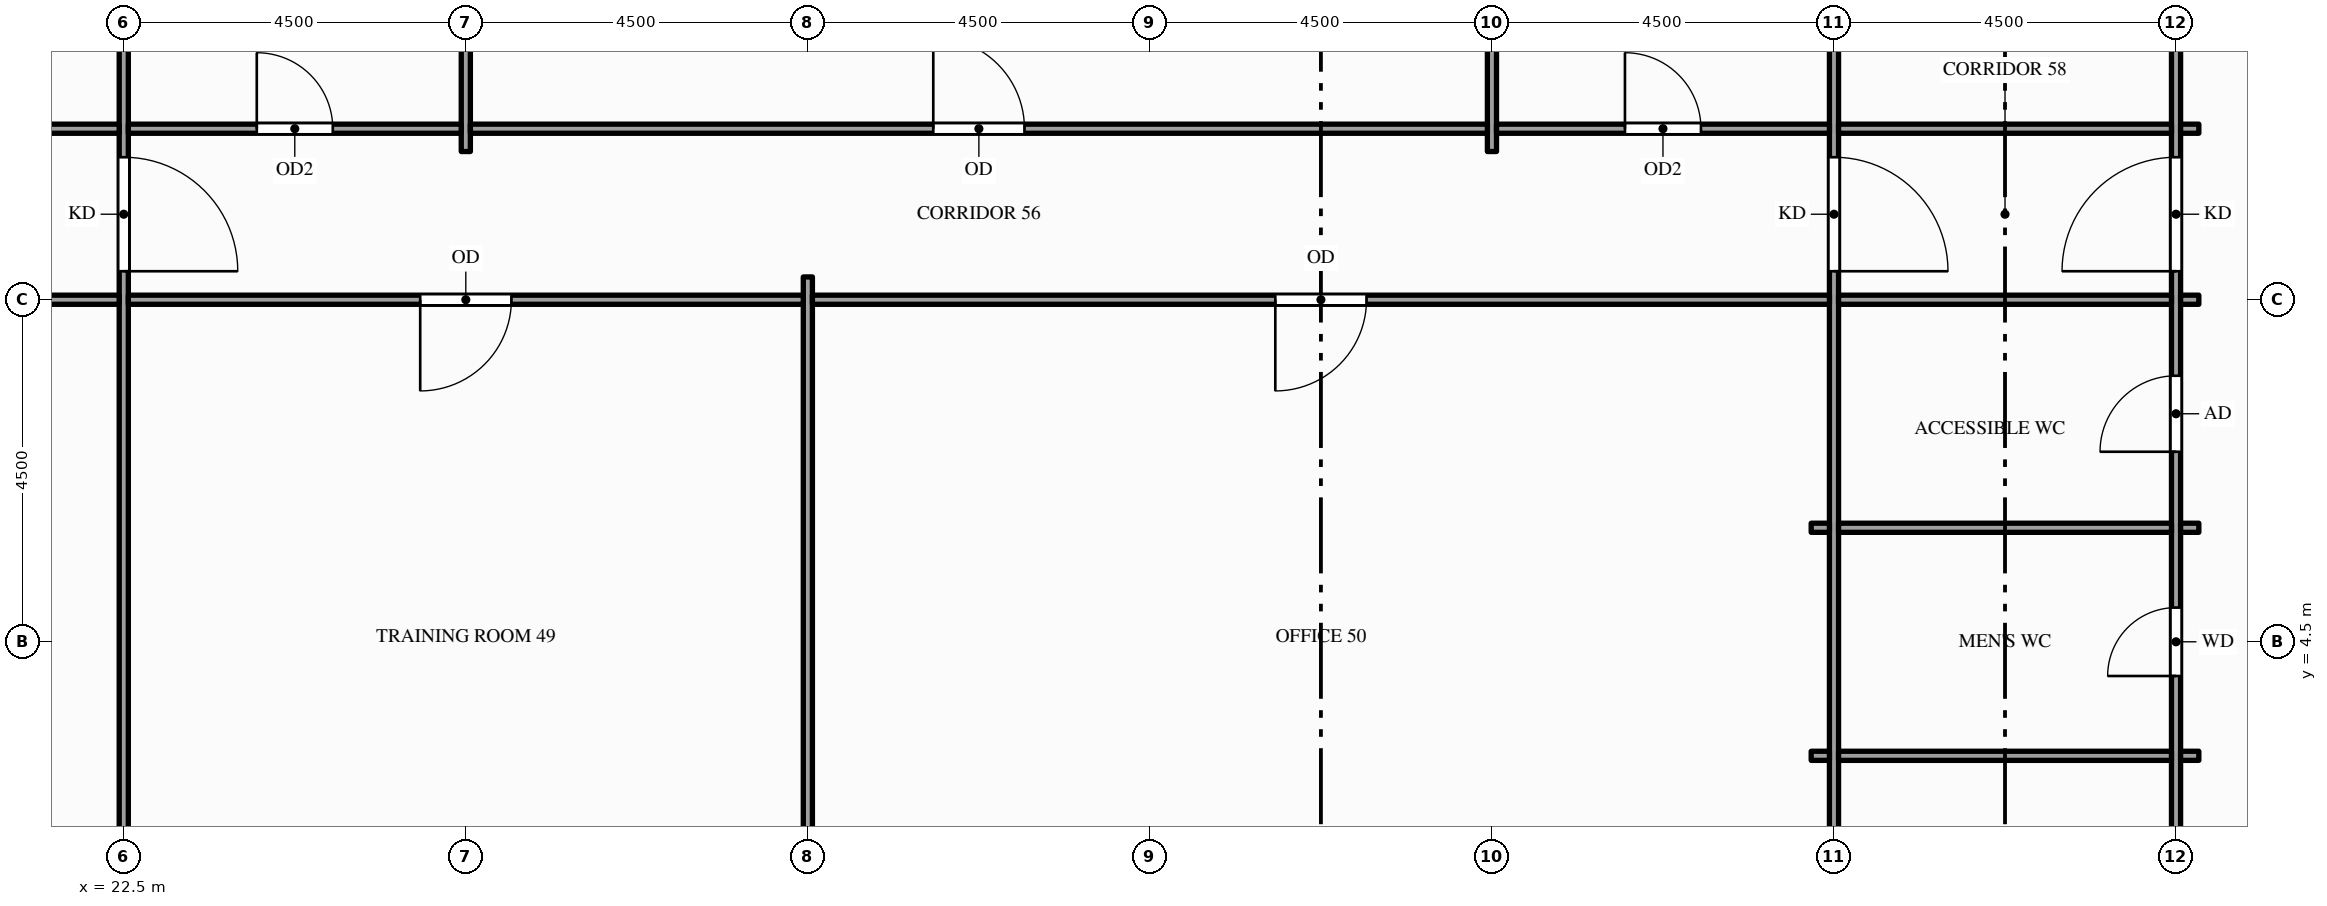
"""IFC4 building model, lengths in metres.
Left out: names, types, materials, properties, quantities, classifications, styles, units other than length and angle.
Written with IfcOpenShell. Run it as: python <this file> out.ifc"""

import sys

from ifc_helpers import new_model, si_unit, direction, frame, frame_2d, origin, place, context, subcontext, project, spatial, rectangle, extrude, element, fill, save


model = new_model("IFC4")
c1 = context("Model", 3, precision=1e-05, world=origin(), true_north=direction((0.0, 1.0)))
c2 = subcontext(c1, "Body", "Model", "MODEL_VIEW")
j1 = project(units=[si_unit("LENGTHUNIT", "METRE"), si_unit("PLANEANGLEUNIT", "RADIAN")], contexts=[c1])
p1 = place(None, origin())
s1 = spatial("IfcSite", under=j1, at=p1, CompositionType="ELEMENT")
p2 = place(p1, origin())
s2 = spatial("IfcBuilding", under=s1, at=p2, CompositionType="ELEMENT")
p3 = place(p2, frame((0.0, 0.0, 24.0)))
s3 = spatial("IfcBuildingStorey", under=s2, at=p3, CompositionType="ELEMENT", Elevation=24.0)
p4 = place(p3, frame((22.5, 0.15, 0.0), z_axis=(0.0, 0.0, 1.0), x_axis=(0.0, 1.0, 0.0)))
e1 = element("IfcWall", 1, at=p4, inside=s3, PredefinedType="PARTITIONING", context=c2, shape_type="SweptSolid", body=[
    extrude(rectangle(XDim=35.95, YDim=0.12, at=frame_2d((17.975, 0.0))), origin(), (0.0, 0.0, 1.0), 3.3),
])
p5 = place(p4, frame((9.225, 0.0, 0.0)))
e2 = element("IfcOpeningElement", 2, at=p5, cuts=e1, PredefinedType="OPENING", context=c2, shape_type="SweptSolid", body=[
    extrude(rectangle(XDim=1.5, YDim=2.1, at=frame_2d((0.75, 1.05))), frame((0.0, 0.07, 0.0), z_axis=(0.0, -1.0, 0.0), x_axis=(1.0, 0.0, 0.0)), (0.0, 0.0, 1.0), 0.14),
])
p6 = place(p4, frame((32.7, 0.0, 0.0)))
e3 = element("IfcOpeningElement", 3, at=p6, cuts=e1, PredefinedType="OPENING", context=c2, shape_type="SweptSolid", body=[
    extrude(rectangle(XDim=1.8, YDim=2.1, at=frame_2d((0.9, 1.05))), frame((0.0, 0.07, 0.0), z_axis=(0.0, -1.0, 0.0), x_axis=(1.0, 0.0, 0.0)), (0.0, 0.0, 1.0), 0.14),
])
p7 = place(p3, frame((27.0, 10.95, 0.0), z_axis=(0.0, 0.0, 1.0), x_axis=(0.0, 1.0, 0.0)))
e4 = element("IfcWall", 4, at=p7, inside=s3, PredefinedType="PARTITIONING", context=c2, shape_type="SweptSolid", body=[
    extrude(rectangle(XDim=11.85, YDim=0.12, at=frame_2d((5.925, 0.0))), origin(), (0.0, 0.0, 1.0), 3.938),
])
p8 = place(p3, frame((31.5, 0.15, 0.0), z_axis=(0.0, 0.0, 1.0), x_axis=(0.0, 1.0, 0.0)))
e5 = element("IfcWall", 5, at=p8, inside=s3, PredefinedType="PARTITIONING", context=c2, shape_type="SweptSolid", body=[
    extrude(rectangle(XDim=9.15, YDim=0.12, at=frame_2d((4.575, 0.0))), origin(), (0.0, 0.0, 1.0), 3.3),
])
p9 = place(p3, frame((40.5, 10.95, 0.0), z_axis=(0.0, 0.0, 1.0), x_axis=(0.0, 1.0, 0.0)))
e6 = element("IfcWall", 6, at=p9, inside=s3, PredefinedType="PARTITIONING", context=c2, shape_type="SweptSolid", body=[
    extrude(rectangle(XDim=11.85, YDim=0.12, at=frame_2d((5.925, 0.0))), origin(), (0.0, 0.0, 1.0), 3.938),
])
p10 = place(p3, frame((45.0, 0.15, 0.0), z_axis=(0.0, 0.0, 1.0), x_axis=(0.0, 1.0, 0.0)))
e7 = element("IfcWall", 7, at=p10, inside=s3, PredefinedType="PARTITIONING", context=c2, shape_type="SweptSolid", body=[
    extrude(rectangle(XDim=22.65, YDim=0.12, at=frame_2d((11.325, 0.0))), origin(), (0.0, 0.0, 1.0), 3.3),
])
p11 = place(p10, frame((9.225, 0.0, 0.0)))
e8 = element("IfcOpeningElement", 8, at=p11, cuts=e7, PredefinedType="OPENING", context=c2, shape_type="SweptSolid", body=[
    extrude(rectangle(XDim=1.5, YDim=2.1, at=frame_2d((0.75, 1.05))), frame((0.0, 0.07, 0.0), z_axis=(0.0, -1.0, 0.0), x_axis=(1.0, 0.0, 0.0)), (0.0, 0.0, 1.0), 0.14),
])
p12 = place(p3, frame((49.5, 0.15, 0.0), z_axis=(0.0, 0.0, 1.0), x_axis=(0.0, 1.0, 0.0)))
e9 = element("IfcWall", 9, at=p12, inside=s3, PredefinedType="PARTITIONING", context=c2, shape_type="SweptSolid", body=[
    extrude(rectangle(XDim=22.65, YDim=0.12, at=frame_2d((11.325, 0.0))), origin(), (0.0, 0.0, 1.0), 3.3),
])
p13 = place(p12, frame((0.955, 0.0, 0.0)))
e10 = element("IfcOpeningElement", 10, at=p13, cuts=e9, PredefinedType="OPENING", context=c2, shape_type="SweptSolid", body=[
    extrude(rectangle(XDim=0.9, YDim=2.1, at=frame_2d((0.45, 1.05))), frame((0.0, 0.07, 0.0), z_axis=(0.0, -1.0, 0.0), x_axis=(1.0, 0.0, 0.0)), (0.0, 0.0, 1.0), 0.14),
])
p14 = place(p12, frame((3.9, 0.0, 0.0)))
e11 = element("IfcOpeningElement", 11, at=p14, cuts=e9, PredefinedType="OPENING", context=c2, shape_type="SweptSolid", body=[
    extrude(rectangle(XDim=0.9, YDim=2.1, at=frame_2d((0.45, 1.05))), frame((0.0, 0.07, 0.0), z_axis=(0.0, -1.0, 0.0), x_axis=(1.0, 0.0, 0.0)), (0.0, 0.0, 1.0), 0.14),
])
p15 = place(p12, frame((6.85, 0.0, 0.0)))
e12 = element("IfcOpeningElement", 12, at=p15, cuts=e9, PredefinedType="OPENING", context=c2, shape_type="SweptSolid", body=[
    extrude(rectangle(XDim=1.0, YDim=2.1, at=frame_2d((0.5, 1.05))), frame((0.0, 0.07, 0.0), z_axis=(0.0, -1.0, 0.0), x_axis=(1.0, 0.0, 0.0)), (0.0, 0.0, 1.0), 0.14),
])
p16 = place(p12, frame((16.275, 0.0, 0.0)))
e13 = element("IfcOpeningElement", 13, at=p16, cuts=e9, PredefinedType="OPENING", context=c2, shape_type="SweptSolid", body=[
    extrude(rectangle(XDim=0.9, YDim=2.1, at=frame_2d((0.45, 1.05))), frame((0.0, 0.07, 0.0), z_axis=(0.0, -1.0, 0.0), x_axis=(1.0, 0.0, 0.0)), (0.0, 0.0, 1.0), 0.14),
])
p17 = place(p12, frame((9.225, 0.0, 0.0)))
e14 = element("IfcOpeningElement", 14, at=p17, cuts=e9, PredefinedType="OPENING", context=c2, shape_type="SweptSolid", body=[
    extrude(rectangle(XDim=1.5, YDim=2.1, at=frame_2d((0.75, 1.05))), frame((0.0, 0.07, 0.0), z_axis=(0.0, -1.0, 0.0), x_axis=(1.0, 0.0, 0.0)), (0.0, 0.0, 1.0), 0.14),
])
p18 = place(p3, frame((44.7, 3.0, 0.0), z_axis=(0.0, 0.0, 1.0), x_axis=(1.0, 0.0, 0.0)))
e15 = element("IfcWall", 15, at=p18, inside=s3, PredefinedType="PARTITIONING", context=c2, shape_type="SweptSolid", body=[
    extrude(rectangle(XDim=0.24, YDim=0.12, at=frame_2d((0.12, 0.0))), origin(), (0.0, 0.0, 1.0), 3.938),
])
p19 = place(p3, frame((45.06, 3.0, 0.0), z_axis=(0.0, 0.0, 1.0), x_axis=(1.0, 0.0, 0.0)))
e16 = element("IfcWall", 16, at=p19, inside=s3, PredefinedType="PARTITIONING", context=c2, shape_type="SweptSolid", body=[
    extrude(rectangle(XDim=4.38, YDim=0.12, at=frame_2d((2.19, 0.0))), origin(), (0.0, 0.0, 1.0), 3.938),
])
for number, where, z_axis, x_axis in (
    (17, (49.56, 3.0, 0.0), (0.0, 0.0, 1.0), (1.0, 0.0, 0.0)),
    (18, (44.7, 6.0, 0.0), (0.0, 0.0, 1.0), (1.0, 0.0, 0.0)),
):
    element("IfcWall", number, at=place(p3, frame(where, z_axis=z_axis, x_axis=x_axis)), inside=s3, PredefinedType="PARTITIONING", context=c2, shape_type="SweptSolid", body=[
        extrude(rectangle(XDim=0.24, YDim=0.12, at=frame_2d((0.12, 0.0))), origin(), (0.0, 0.0, 1.0), 3.938),
    ])
p20 = place(p3, frame((45.06, 6.0, 0.0), z_axis=(0.0, 0.0, 1.0), x_axis=(1.0, 0.0, 0.0)))
e19 = element("IfcWall", 19, at=p20, inside=s3, PredefinedType="PARTITIONING", context=c2, shape_type="SweptSolid", body=[
    extrude(rectangle(XDim=4.38, YDim=0.12, at=frame_2d((2.19, 0.0))), origin(), (0.0, 0.0, 1.0), 3.938),
])
p21 = place(p3, frame((49.56, 6.0, 0.0), z_axis=(0.0, 0.0, 1.0), x_axis=(1.0, 0.0, 0.0)))
e20 = element("IfcWall", 20, at=p21, inside=s3, PredefinedType="PARTITIONING", context=c2, shape_type="SweptSolid", body=[
    extrude(rectangle(XDim=0.24, YDim=0.12, at=frame_2d((0.12, 0.0))), origin(), (0.0, 0.0, 1.0), 3.938),
])
p22 = place(p3, frame((13.56, 9.0, 0.0), z_axis=(0.0, 0.0, 1.0), x_axis=(1.0, 0.0, 0.0)))
e21 = element("IfcWall", 21, at=p22, inside=s3, PredefinedType="PARTITIONING", context=c2, shape_type="SweptSolid", body=[
    extrude(rectangle(XDim=8.88, YDim=0.12, at=frame_2d((4.44, 0.0))), origin(), (0.0, 0.0, 1.0), 3.938),
])
p23 = place(p22, frame((3.94, 0.0, 0.0)))
e22 = element("IfcOpeningElement", 22, at=p23, cuts=e21, PredefinedType="OPENING", context=c2, shape_type="SweptSolid", body=[
    extrude(rectangle(XDim=1.0, YDim=2.1, at=frame_2d((0.5, 1.05))), frame((0.0, 0.07, 0.0), z_axis=(0.0, -1.0, 0.0), x_axis=(1.0, 0.0, 0.0)), (0.0, 0.0, 1.0), 0.14),
])
p24 = place(p3, frame((22.56, 9.0, 0.0), z_axis=(0.0, 0.0, 1.0), x_axis=(1.0, 0.0, 0.0)))
e23 = element("IfcWall", 23, at=p24, inside=s3, PredefinedType="PARTITIONING", context=c2, shape_type="SweptSolid", body=[
    extrude(rectangle(XDim=8.88, YDim=0.12, at=frame_2d((4.44, 0.0))), origin(), (0.0, 0.0, 1.0), 3.788),
])
p25 = place(p24, frame((3.84, 0.0, 0.0)))
e24 = element("IfcOpeningElement", 24, at=p25, cuts=e23, PredefinedType="OPENING", context=c2, shape_type="SweptSolid", body=[
    extrude(rectangle(XDim=1.2, YDim=2.1, at=frame_2d((0.6, 1.05))), frame((0.0, 0.07, 0.0), z_axis=(0.0, -1.0, 0.0), x_axis=(1.0, 0.0, 0.0)), (0.0, 0.0, 1.0), 0.14),
])
p26 = place(p3, frame((31.56, 9.0, 0.0), z_axis=(0.0, 0.0, 1.0), x_axis=(1.0, 0.0, 0.0)))
e25 = element("IfcWall", 25, at=p26, inside=s3, PredefinedType="PARTITIONING", context=c2, shape_type="SweptSolid", body=[
    extrude(rectangle(XDim=13.38, YDim=0.12, at=frame_2d((6.69, 0.0))), origin(), (0.0, 0.0, 1.0), 3.938),
])
p27 = place(p26, frame((6.09, 0.0, 0.0)))
e26 = element("IfcOpeningElement", 26, at=p27, cuts=e25, PredefinedType="OPENING", context=c2, shape_type="SweptSolid", body=[
    extrude(rectangle(XDim=1.2, YDim=2.1, at=frame_2d((0.6, 1.05))), frame((0.0, 0.07, 0.0), z_axis=(0.0, -1.0, 0.0), x_axis=(1.0, 0.0, 0.0)), (0.0, 0.0, 1.0), 0.14),
])
p28 = place(p3, frame((45.06, 9.0, 0.0), z_axis=(0.0, 0.0, 1.0), x_axis=(1.0, 0.0, 0.0)))
e27 = element("IfcWall", 27, at=p28, inside=s3, PredefinedType="PARTITIONING", context=c2, shape_type="SweptSolid", body=[
    extrude(rectangle(XDim=4.38, YDim=0.12, at=frame_2d((2.19, 0.0))), origin(), (0.0, 0.0, 1.0), 3.938),
])
p29 = place(p3, frame((49.56, 9.0, 0.0), z_axis=(0.0, 0.0, 1.0), x_axis=(1.0, 0.0, 0.0)))
e28 = element("IfcWall", 28, at=p29, inside=s3, PredefinedType="PARTITIONING", context=c2, shape_type="SweptSolid", body=[
    extrude(rectangle(XDim=0.24, YDim=0.12, at=frame_2d((0.12, 0.0))), origin(), (0.0, 0.0, 1.0), 3.938),
])
p30 = place(p3, frame((11.31, 11.25, 0.0), z_axis=(0.0, 0.0, 1.0), x_axis=(1.0, 0.0, 0.0)))
e29 = element("IfcWall", 29, at=p30, inside=s3, PredefinedType="PARTITIONING", context=c2, shape_type="SweptSolid", body=[
    extrude(rectangle(XDim=11.13, YDim=0.12, at=frame_2d((5.565, 0.0))), origin(), (0.0, 0.0, 1.0), 3.938),
])
p31 = place(p3, frame((22.56, 11.25, 0.0), z_axis=(0.0, 0.0, 1.0), x_axis=(1.0, 0.0, 0.0)))
e30 = element("IfcWall", 30, at=p31, inside=s3, PredefinedType="PARTITIONING", context=c2, shape_type="SweptSolid", body=[
    extrude(rectangle(XDim=4.38, YDim=0.12, at=frame_2d((2.19, 0.0))), origin(), (0.0, 0.0, 1.0), 3.788),
])
p32 = place(p31, frame((1.69, 0.0, 0.0)))
e31 = element("IfcOpeningElement", 31, at=p32, cuts=e30, PredefinedType="OPENING", context=c2, shape_type="SweptSolid", body=[
    extrude(rectangle(XDim=1.0, YDim=2.1, at=frame_2d((0.5, 1.05))), frame((0.0, 0.07, 0.0), z_axis=(0.0, -1.0, 0.0), x_axis=(1.0, 0.0, 0.0)), (0.0, 0.0, 1.0), 0.14),
])
p33 = place(p3, frame((27.06, 11.25, 0.0), z_axis=(0.0, 0.0, 1.0), x_axis=(1.0, 0.0, 0.0)))
e32 = element("IfcWall", 32, at=p33, inside=s3, PredefinedType="PARTITIONING", context=c2, shape_type="SweptSolid", body=[
    extrude(rectangle(XDim=13.38, YDim=0.12, at=frame_2d((6.69, 0.0))), origin(), (0.0, 0.0, 1.0), 3.938),
])
p34 = place(p33, frame((6.09, 0.0, 0.0)))
e33 = element("IfcOpeningElement", 33, at=p34, cuts=e32, PredefinedType="OPENING", context=c2, shape_type="SweptSolid", body=[
    extrude(rectangle(XDim=1.2, YDim=2.1, at=frame_2d((0.6, 1.05))), frame((0.0, 0.07, 0.0), z_axis=(0.0, -1.0, 0.0), x_axis=(1.0, 0.0, 0.0)), (0.0, 0.0, 1.0), 0.14),
])
p35 = place(p3, frame((40.56, 11.25, 0.0), z_axis=(0.0, 0.0, 1.0), x_axis=(1.0, 0.0, 0.0)))
e34 = element("IfcWall", 34, at=p35, inside=s3, PredefinedType="PARTITIONING", context=c2, shape_type="SweptSolid", body=[
    extrude(rectangle(XDim=4.38, YDim=0.12, at=frame_2d((2.19, 0.0))), origin(), (0.0, 0.0, 1.0), 3.938),
])
p36 = place(p35, frame((1.69, 0.0, 0.0)))
e35 = element("IfcOpeningElement", 35, at=p36, cuts=e34, PredefinedType="OPENING", context=c2, shape_type="SweptSolid", body=[
    extrude(rectangle(XDim=1.0, YDim=2.1, at=frame_2d((0.5, 1.05))), frame((0.0, 0.07, 0.0), z_axis=(0.0, -1.0, 0.0), x_axis=(1.0, 0.0, 0.0)), (0.0, 0.0, 1.0), 0.14),
])
p37 = place(p3, frame((45.06, 11.25, 0.0), z_axis=(0.0, 0.0, 1.0), x_axis=(1.0, 0.0, 0.0)))
e36 = element("IfcWall", 36, at=p37, inside=s3, PredefinedType="PARTITIONING", context=c2, shape_type="SweptSolid", body=[
    extrude(rectangle(XDim=4.38, YDim=0.12, at=frame_2d((2.19, 0.0))), origin(), (0.0, 0.0, 1.0), 3.938),
])
p38 = place(p3, frame((49.56, 11.25, 0.0), z_axis=(0.0, 0.0, 1.0), x_axis=(1.0, 0.0, 0.0)))
e37 = element("IfcWall", 37, at=p38, inside=s3, PredefinedType="PARTITIONING", context=c2, shape_type="SweptSolid", body=[
    extrude(rectangle(XDim=0.24, YDim=0.12, at=frame_2d((0.12, 0.0))), origin(), (0.0, 0.0, 1.0), 3.938),
])
p39 = place(p14, origin())
e38 = element("IfcDoor", 38, at=p39, inside=s3, OperationType="SINGLE_SWING_LEFT", PredefinedType="DOOR", context=c2, shape_type="SweptSolid", body=[
    extrude(rectangle(XDim=0.9, YDim=2.1, at=frame_2d((0.45, 1.05))), frame((0.0, 0.025, 0.0), z_axis=(0.0, -1.0, 0.0), x_axis=(1.0, 0.0, 0.0)), (0.0, 0.0, 1.0), 0.05),
])
fill(e11, e38)
p40 = place(p15, origin())
e39 = element("IfcDoor", 39, at=p40, inside=s3, OperationType="SINGLE_SWING_LEFT", PredefinedType="DOOR", context=c2, shape_type="SweptSolid", body=[
    extrude(rectangle(XDim=1.0, YDim=2.1, at=frame_2d((0.5, 1.05))), frame((0.0, 0.025, 0.0), z_axis=(0.0, -1.0, 0.0), x_axis=(1.0, 0.0, 0.0)), (0.0, 0.0, 1.0), 0.05),
])
fill(e12, e39)
p41 = place(p17, origin())
e40 = element("IfcDoor", 40, at=p41, inside=s3, OperationType="SINGLE_SWING_LEFT", PredefinedType="DOOR", context=c2, shape_type="SweptSolid", body=[
    extrude(rectangle(XDim=1.5, YDim=2.1, at=frame_2d((0.75, 1.05))), frame((0.0, 0.025, 0.0), z_axis=(0.0, -1.0, 0.0), x_axis=(1.0, 0.0, 0.0)), (0.0, 0.0, 1.0), 0.05),
])
fill(e14, e40)
p42 = place(p11, origin())
e41 = element("IfcDoor", 41, at=p42, inside=s3, OperationType="SINGLE_SWING_LEFT", PredefinedType="DOOR", context=c2, shape_type="SweptSolid", body=[
    extrude(rectangle(XDim=1.5, YDim=2.1, at=frame_2d((0.75, 1.05))), frame((0.0, 0.025, 0.0), z_axis=(0.0, -1.0, 0.0), x_axis=(1.0, 0.0, 0.0)), (0.0, 0.0, 1.0), 0.05),
])
fill(e8, e41)
p43 = place(p25, origin())
e42 = element("IfcDoor", 42, at=p43, inside=s3, OperationType="SINGLE_SWING_LEFT", PredefinedType="DOOR", context=c2, shape_type="SweptSolid", body=[
    extrude(rectangle(XDim=1.2, YDim=2.1, at=frame_2d((0.6, 1.05))), frame((0.0, 0.025, 0.0), z_axis=(0.0, -1.0, 0.0), x_axis=(1.0, 0.0, 0.0)), (0.0, 0.0, 1.0), 0.05),
])
fill(e24, e42)
p44 = place(p27, origin())
e43 = element("IfcDoor", 43, at=p44, inside=s3, OperationType="SINGLE_SWING_LEFT", PredefinedType="DOOR", context=c2, shape_type="SweptSolid", body=[
    extrude(rectangle(XDim=1.2, YDim=2.1, at=frame_2d((0.6, 1.05))), frame((0.0, 0.025, 0.0), z_axis=(0.0, -1.0, 0.0), x_axis=(1.0, 0.0, 0.0)), (0.0, 0.0, 1.0), 0.05),
])
fill(e26, e43)
p45 = place(p32, origin())
e44 = element("IfcDoor", 44, at=p45, inside=s3, OperationType="SINGLE_SWING_LEFT", PredefinedType="DOOR", context=c2, shape_type="SweptSolid", body=[
    extrude(rectangle(XDim=1.0, YDim=2.1, at=frame_2d((0.5, 1.05))), frame((0.0, 0.025, 0.0), z_axis=(0.0, -1.0, 0.0), x_axis=(1.0, 0.0, 0.0)), (0.0, 0.0, 1.0), 0.05),
])
fill(e31, e44)
p46 = place(p34, origin())
e45 = element("IfcDoor", 45, at=p46, inside=s3, OperationType="SINGLE_SWING_LEFT", PredefinedType="DOOR", context=c2, shape_type="SweptSolid", body=[
    extrude(rectangle(XDim=1.2, YDim=2.1, at=frame_2d((0.6, 1.05))), frame((0.0, 0.025, 0.0), z_axis=(0.0, -1.0, 0.0), x_axis=(1.0, 0.0, 0.0)), (0.0, 0.0, 1.0), 0.05),
])
fill(e33, e45)
p47 = place(p36, origin())
e46 = element("IfcDoor", 46, at=p47, inside=s3, OperationType="SINGLE_SWING_LEFT", PredefinedType="DOOR", context=c2, shape_type="SweptSolid", body=[
    extrude(rectangle(XDim=1.0, YDim=2.1, at=frame_2d((0.5, 1.05))), frame((0.0, 0.025, 0.0), z_axis=(0.0, -1.0, 0.0), x_axis=(1.0, 0.0, 0.0)), (0.0, 0.0, 1.0), 0.05),
])
fill(e35, e46)
p48 = place(p5, origin())
e47 = element("IfcDoor", 47, at=p48, inside=s3, OperationType="SINGLE_SWING_LEFT", PredefinedType="DOOR", context=c2, shape_type="SweptSolid", body=[
    extrude(rectangle(XDim=1.5, YDim=2.1, at=frame_2d((0.75, 1.05))), frame((0.0, 0.025, 0.0), z_axis=(0.0, -1.0, 0.0), x_axis=(1.0, 0.0, 0.0)), (0.0, 0.0, 1.0), 0.05),
])
fill(e2, e47)
save(model, sys.argv[1])
